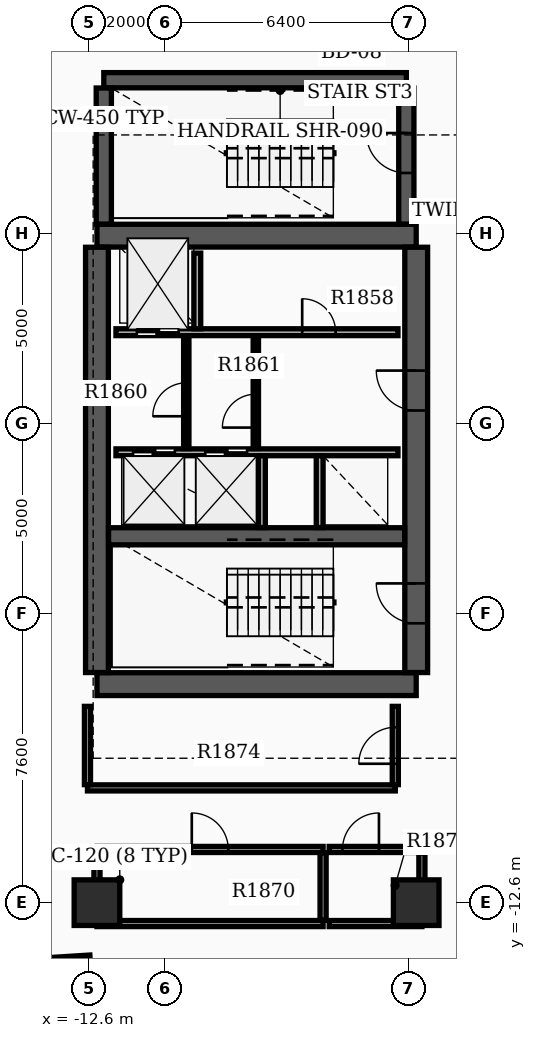
"""IFC4 building model, lengths in metres.
Left out: names, types, materials, properties, quantities, classifications, styles, units other than length and angle.
Written with IfcOpenShell. Run it as: python <this file> out.ifc"""

import sys

from ifc_helpers import new_model, si_unit, direction, frame, frame_2d, origin, origin_2d, place, context, subcontext, project, spatial, rectangle, extrude, element, fill, save


model = new_model("IFC4")
c1 = context("Model", 3, precision=1e-05, world=origin(), true_north=direction((0.0, 1.0)))
c2 = subcontext(c1, "Body", "Model", "MODEL_VIEW")
j1 = project(units=[si_unit("LENGTHUNIT", "METRE"), si_unit("PLANEANGLEUNIT", "RADIAN")], contexts=[c1])
p1 = place(None, origin())
s1 = spatial("IfcSite", under=j1, at=p1, CompositionType="ELEMENT")
p2 = place(p1, origin())
s2 = spatial("IfcBuilding", under=s1, at=p2, CompositionType="ELEMENT")
p3 = place(p2, frame((0.0, 0.0, 120.3)))
s3 = spatial("IfcBuildingStorey", under=s2, at=p3, CompositionType="ELEMENT", Elevation=120.3)
for number, where, z_axis, x_axis in (
    (1, (-12.4, -6.85, 0.0), (0.0, 0.0, 1.0), (1.0, 0.0, 0.0)),
    (2, (-12.4, 4.95, 0.0), (0.0, 0.0, 1.0), (1.0, 0.0, 0.0)),
):
    element("IfcWall", number, at=place(p3, frame(where, z_axis=z_axis, x_axis=x_axis)), inside=s3, PredefinedType="SHEAR", context=c2, shape_type="SweptSolid", body=[
        extrude(rectangle(XDim=8.4, YDim=0.6, at=frame_2d((4.2, 0.0))), origin(), (0.0, 0.0, 1.0), 3.7),
    ])
p4 = place(p3, frame((-12.4, -6.545, 0.0), z_axis=(0.0, 0.0, 1.0), x_axis=(0.0, 1.0, 0.0)))
e3 = element("IfcWall", 3, at=p4, inside=s3, PredefinedType="SHEAR", context=c2, shape_type="SweptSolid", body=[
    extrude(rectangle(XDim=11.19, YDim=0.6, at=frame_2d((5.595, 0.0))), origin(), (0.0, 0.0, 1.0), 3.7),
])
p5 = place(p3, frame((-4.0, -6.545, 0.0), z_axis=(0.0, 0.0, 1.0), x_axis=(0.0, 1.0, 0.0)))
e4 = element("IfcWall", 4, at=p5, inside=s3, PredefinedType="SHEAR", context=c2, shape_type="SweptSolid", body=[
    extrude(rectangle(XDim=11.19, YDim=0.6, at=frame_2d((5.595, 0.0))), origin(), (0.0, 0.0, 1.0), 3.7),
])
p6 = place(p5, frame((1.295, 0.0, 0.0)))
e5 = element("IfcOpeningElement", 5, at=p6, cuts=e4, PredefinedType="OPENING", context=c2, shape_type="SweptSolid", body=[
    extrude(rectangle(XDim=1.05, YDim=2.15, at=frame_2d((0.525, 1.075))), frame((0.0, 0.31, 0.0), z_axis=(0.0, -1.0, 0.0), x_axis=(1.0, 0.0, 0.0)), (0.0, 0.0, 1.0), 0.62),
])
p7 = place(p5, frame((6.895, 0.0, 0.0)))
e6 = element("IfcOpeningElement", 6, at=p7, cuts=e4, PredefinedType="OPENING", context=c2, shape_type="SweptSolid", body=[
    extrude(rectangle(XDim=1.05, YDim=2.15, at=frame_2d((0.525, 1.075))), frame((0.0, 0.31, 0.0), z_axis=(0.0, -1.0, 0.0), x_axis=(1.0, 0.0, 0.0)), (0.0, 0.0, 1.0), 0.62),
])
p8 = place(p3, frame((-12.095, -2.96, 0.0), z_axis=(0.0, 0.0, 1.0), x_axis=(1.0, 0.0, 0.0)))
e7 = element("IfcWall", 7, at=p8, inside=s3, PredefinedType="SHEAR", context=c2, shape_type="SweptSolid", body=[
    extrude(rectangle(XDim=7.79, YDim=0.45, at=frame_2d((3.895, 0.0))), origin(), (0.0, 0.0, 1.0), 3.7),
])
p9 = place(p3, frame((-12.22, 9.04, 0.0), z_axis=(0.0, 0.0, 1.0), x_axis=(1.0, 0.0, 0.0)))
e8 = element("IfcWall", 8, at=p9, inside=s3, PredefinedType="SHEAR", context=c2, shape_type="SweptSolid", body=[
    extrude(rectangle(XDim=7.96, YDim=0.4, at=frame_2d((3.98, 0.0))), origin(), (0.0, 0.0, 1.0), 3.7),
])
p10 = place(p3, frame((-12.22, 5.255, 0.0), z_axis=(0.0, 0.0, 1.0), x_axis=(0.0, 1.0, 0.0)))
e9 = element("IfcWall", 9, at=p10, inside=s3, PredefinedType="SHEAR", context=c2, shape_type="SweptSolid", body=[
    extrude(rectangle(XDim=3.58, YDim=0.4, at=frame_2d((1.79, 0.0))), origin(), (0.0, 0.0, 1.0), 3.7),
])
p11 = place(p3, frame((-4.26, 5.255, 0.0), z_axis=(0.0, 0.0, 1.0), x_axis=(0.0, 1.0, 0.0)))
e10 = element("IfcWall", 10, at=p11, inside=s3, PredefinedType="SHEAR", context=c2, shape_type="SweptSolid", body=[
    extrude(rectangle(XDim=3.58, YDim=0.4, at=frame_2d((1.79, 0.0))), origin(), (0.0, 0.0, 1.0), 3.7),
])
p12 = place(p11, frame((1.345, 0.0, 0.0)))
e11 = element("IfcOpeningElement", 11, at=p12, cuts=e10, PredefinedType="OPENING", context=c2, shape_type="SweptSolid", body=[
    extrude(rectangle(XDim=1.05, YDim=2.15, at=frame_2d((0.525, 1.075))), frame((0.0, 0.21, 0.0), z_axis=(0.0, -1.0, 0.0), x_axis=(1.0, 0.0, 0.0)), (0.0, 0.0, 1.0), 0.42),
])
for number, where, z_axis, x_axis in (
    (12, (-12.4, -12.6, 0.0), (0.0, 0.0, 1.0), (1.0, 0.0, 0.0)),
    (13, (-4.0, -12.6, 0.0), (0.0, 0.0, 1.0), (1.0, 0.0, 0.0)),
):
    element("IfcColumn", number, at=place(p3, frame(where, z_axis=z_axis, x_axis=x_axis)), inside=s3, PredefinedType="COLUMN", context=c2, shape_type="SweptSolid", body=[
        extrude(rectangle(XDim=1.2, YDim=1.2, at=origin_2d()), origin(), (0.0, 0.0, 1.0), 3.9),
    ])
p13 = place(p3, frame((-13.796, -14.194, 0.0), z_axis=(0.0, 0.0, 1.0), x_axis=(0.998023660242, 0.06283926796, 0.0)))
e14 = element("IfcWall", 14, at=p13, inside=s3, PredefinedType="STANDARD", context=c2, shape_type="SweptSolid", body=[
    extrude(rectangle(XDim=1.22, YDim=0.28, at=frame_2d((0.61, 0.0))), origin(), (0.0, 0.0, 1.0), 2.97),
])
p14 = place(p3, frame((-11.9, 2.41, 0.0), z_axis=(0.0, 0.0, 1.0), x_axis=(1.0, 0.0, 0.0)))
e15 = element("IfcWall", 15, at=p14, inside=s3, PredefinedType="SOLIDWALL", context=c2, shape_type="SweptSolid", body=[
    extrude(rectangle(XDim=7.42, YDim=0.18, at=frame_2d((3.71, 0.0))), origin(), (0.0, 0.0, 1.0), 2.96),
])
p15 = place(p14, frame((0.55, 0.0, 0.0)))
e16 = element("IfcOpeningElement", 16, at=p15, cuts=e15, PredefinedType="OPENING", context=c2, shape_type="SweptSolid", body=[
    extrude(rectangle(XDim=1.1, YDim=2.15, at=frame_2d((0.55, 1.075))), frame((0.0, 0.1, 0.0), z_axis=(0.0, -1.0, 0.0), x_axis=(1.0, 0.0, 0.0)), (0.0, 0.0, 1.0), 0.2),
])
p16 = place(p14, frame((4.9, 0.0, 0.0)))
e17 = element("IfcOpeningElement", 17, at=p16, cuts=e15, PredefinedType="OPENING", context=c2, shape_type="SweptSolid", body=[
    extrude(rectangle(XDim=0.88, YDim=2.1, at=frame_2d((0.44, 1.05))), frame((0.0, 0.1, 0.0), z_axis=(0.0, -1.0, 0.0), x_axis=(1.0, 0.0, 0.0)), (0.0, 0.0, 1.0), 0.2),
])
p17 = place(p3, frame((-11.9, -0.75, 0.0), z_axis=(0.0, 0.0, 1.0), x_axis=(1.0, 0.0, 0.0)))
e18 = element("IfcWall", 18, at=p17, inside=s3, PredefinedType="SOLIDWALL", context=c2, shape_type="SweptSolid", body=[
    extrude(rectangle(XDim=7.42, YDim=0.18, at=frame_2d((3.71, 0.0))), origin(), (0.0, 0.0, 1.0), 2.96),
])
p18 = place(p17, frame((0.45, 0.0, 0.0)))
e19 = element("IfcOpeningElement", 19, at=p18, cuts=e18, PredefinedType="OPENING", context=c2, shape_type="SweptSolid", body=[
    extrude(rectangle(XDim=1.1, YDim=2.15, at=frame_2d((0.55, 1.075))), frame((0.0, 0.1, 0.0), z_axis=(0.0, -1.0, 0.0), x_axis=(1.0, 0.0, 0.0)), (0.0, 0.0, 1.0), 0.2),
])
p19 = place(p17, frame((2.35, 0.0, 0.0)))
e20 = element("IfcOpeningElement", 20, at=p19, cuts=e18, PredefinedType="OPENING", context=c2, shape_type="SweptSolid", body=[
    extrude(rectangle(XDim=1.1, YDim=2.15, at=frame_2d((0.55, 1.075))), frame((0.0, 0.1, 0.0), z_axis=(0.0, -1.0, 0.0), x_axis=(1.0, 0.0, 0.0)), (0.0, 0.0, 1.0), 0.2),
])
p20 = place(p3, frame((-9.76, 2.5, 0.0), z_axis=(0.0, 0.0, 1.0), x_axis=(0.0, 1.0, 0.0)))
e21 = element("IfcWall", 21, at=p20, inside=s3, PredefinedType="SOLIDWALL", context=c2, shape_type="SweptSolid", body=[
    extrude(rectangle(XDim=1.99, YDim=0.18, at=frame_2d((0.995, 0.0))), origin(), (0.0, 0.0, 1.0), 2.96),
])
for number, where, z_axis, x_axis in (
    (22, (-8.06, -2.73, 0.0), (0.0, 0.0, 1.0), (0.0, 1.0, 0.0)),
    (23, (-6.54, -2.73, 0.0), (0.0, 0.0, 1.0), (0.0, 1.0, 0.0)),
):
    element("IfcWall", number, at=place(p3, frame(where, z_axis=z_axis, x_axis=x_axis)), inside=s3, PredefinedType="SOLIDWALL", context=c2, shape_type="SweptSolid", body=[
        extrude(rectangle(XDim=1.89, YDim=0.18, at=frame_2d((0.945, 0.0))), origin(), (0.0, 0.0, 1.0), 2.96),
    ])
p21 = place(p3, frame((-8.22, -0.65, 0.0), z_axis=(0.0, 0.0, 1.0), x_axis=(0.0, 1.0, 0.0)))
e24 = element("IfcWall", 24, at=p21, inside=s3, PredefinedType="SOLIDWALL", context=c2, shape_type="SweptSolid", body=[
    extrude(rectangle(XDim=2.96, YDim=0.14, at=frame_2d((1.48, 0.0))), origin(), (0.0, 0.0, 1.0), 2.96),
])
p22 = place(p21, frame((0.55, 0.0, 0.0)))
e25 = element("IfcOpeningElement", 25, at=p22, cuts=e24, PredefinedType="OPENING", context=c2, shape_type="SweptSolid", body=[
    extrude(rectangle(XDim=0.88, YDim=2.1, at=frame_2d((0.44, 1.05))), frame((0.0, 0.08, 0.0), z_axis=(0.0, -1.0, 0.0), x_axis=(1.0, 0.0, 0.0)), (0.0, 0.0, 1.0), 0.16),
])
p23 = place(p3, frame((-10.05, -0.652, 0.0), z_axis=(0.0, 0.0, 1.0), x_axis=(0.0, 1.0, 0.0)))
e26 = element("IfcWall", 26, at=p23, inside=s3, PredefinedType="PARTITIONING", context=c2, shape_type="SweptSolid", body=[
    extrude(rectangle(XDim=2.962, YDim=0.14, at=frame_2d((1.481, 0.0))), origin(), (0.0, 0.0, 1.0), 2.96),
])
p24 = place(p23, frame((0.85, 0.0, 0.0)))
e27 = element("IfcOpeningElement", 27, at=p24, cuts=e26, PredefinedType="OPENING", context=c2, shape_type="SweptSolid", body=[
    extrude(rectangle(XDim=0.88, YDim=2.1, at=frame_2d((0.44, 1.05))), frame((0.0, 0.08, 0.0), z_axis=(0.0, -1.0, 0.0), x_axis=(1.0, 0.0, 0.0)), (0.0, 0.0, 1.0), 0.16),
])
p25 = place(p3, frame((-12.4, -13.15, 0.0), z_axis=(0.0, 0.0, 1.0), x_axis=(1.0, 0.0, 0.0)))
e28 = element("IfcWall", 28, at=p25, inside=s3, PredefinedType="PARTITIONING", context=c2, shape_type="SweptSolid", body=[
    extrude(rectangle(XDim=5.95, YDim=0.16, at=frame_2d((2.975, 0.0))), origin(), (0.0, 0.0, 1.0), 2.96),
])
p26 = place(p3, frame((-12.4, -11.2, 0.0), z_axis=(0.0, 0.0, 1.0), x_axis=(1.0, 0.0, 0.0)))
e29 = element("IfcWall", 29, at=p26, inside=s3, PredefinedType="PARTITIONING", context=c2, shape_type="SweptSolid", body=[
    extrude(rectangle(XDim=5.95, YDim=0.16, at=frame_2d((2.975, 0.0))), origin(), (0.0, 0.0, 1.0), 2.96),
])
p27 = place(p26, frame((2.495, 0.0, 0.0)))
e30 = element("IfcOpeningElement", 30, at=p27, cuts=e29, PredefinedType="OPENING", context=c2, shape_type="SweptSolid", body=[
    extrude(rectangle(XDim=0.96, YDim=2.15, at=frame_2d((0.48, 1.075))), frame((0.0, 0.09, 0.0), z_axis=(0.0, -1.0, 0.0), x_axis=(1.0, 0.0, 0.0)), (0.0, 0.0, 1.0), 0.18),
])
for number, where, z_axis, x_axis in (
    (31, (-12.4, -13.065, 0.0), (0.0, 0.0, 1.0), (0.0, 1.0, 0.0)),
    (32, (-6.45, -13.065, 0.0), (0.0, 0.0, 1.0), (0.0, 1.0, 0.0)),
):
    element("IfcWall", number, at=place(p3, frame(where, z_axis=z_axis, x_axis=x_axis)), inside=s3, PredefinedType="PARTITIONING", context=c2, shape_type="SweptSolid", body=[
        extrude(rectangle(XDim=1.78, YDim=0.16, at=frame_2d((0.89, 0.0))), origin(), (0.0, 0.0, 1.0), 2.96),
    ])
p28 = place(p3, frame((-6.29, -13.15, 0.0), z_axis=(0.0, 0.0, 1.0), x_axis=(1.0, 0.0, 0.0)))
e33 = element("IfcWall", 33, at=p28, inside=s3, PredefinedType="PARTITIONING", context=c2, shape_type="SweptSolid", body=[
    extrude(rectangle(XDim=2.44, YDim=0.16, at=frame_2d((1.22, 0.0))), origin(), (0.0, 0.0, 1.0), 2.96),
])
p29 = place(p3, frame((-6.29, -11.2, 0.0), z_axis=(0.0, 0.0, 1.0), x_axis=(1.0, 0.0, 0.0)))
e34 = element("IfcWall", 34, at=p29, inside=s3, PredefinedType="PARTITIONING", context=c2, shape_type="SweptSolid", body=[
    extrude(rectangle(XDim=2.44, YDim=0.16, at=frame_2d((1.22, 0.0))), origin(), (0.0, 0.0, 1.0), 2.96),
])
p30 = place(p29, frame((0.35, 0.0, 0.0)))
e35 = element("IfcOpeningElement", 35, at=p30, cuts=e34, PredefinedType="OPENING", context=c2, shape_type="SweptSolid", body=[
    extrude(rectangle(XDim=0.96, YDim=2.15, at=frame_2d((0.48, 1.075))), frame((0.0, 0.09, 0.0), z_axis=(0.0, -1.0, 0.0), x_axis=(1.0, 0.0, 0.0)), (0.0, 0.0, 1.0), 0.18),
])
p31 = place(p3, frame((-3.85, -13.065, 0.0), z_axis=(0.0, 0.0, 1.0), x_axis=(0.0, 1.0, 0.0)))
e36 = element("IfcWall", 36, at=p31, inside=s3, PredefinedType="PARTITIONING", context=c2, shape_type="SweptSolid", body=[
    extrude(rectangle(XDim=1.78, YDim=0.16, at=frame_2d((0.89, 0.0))), origin(), (0.0, 0.0, 1.0), 2.96),
])
p32 = place(p3, frame((-12.65, -9.58, 0.0), z_axis=(0.0, 0.0, 1.0), x_axis=(1.0, 0.0, 0.0)))
e37 = element("IfcWall", 37, at=p32, inside=s3, PredefinedType="PARTITIONING", context=c2, shape_type="SweptSolid", body=[
    extrude(rectangle(XDim=8.1, YDim=0.16, at=frame_2d((4.05, 0.0))), origin(), (0.0, 0.0, 1.0), 2.96),
])
p33 = place(p3, frame((-12.65, -9.495, 0.0), z_axis=(0.0, 0.0, 1.0), x_axis=(0.0, 1.0, 0.0)))
e38 = element("IfcWall", 38, at=p33, inside=s3, PredefinedType="PARTITIONING", context=c2, shape_type="SweptSolid", body=[
    extrude(rectangle(XDim=2.06, YDim=0.16, at=frame_2d((1.03, 0.0))), origin(), (0.0, 0.0, 1.0), 2.96),
])
p34 = place(p3, frame((-4.55, -9.495, 0.0), z_axis=(0.0, 0.0, 1.0), x_axis=(0.0, 1.0, 0.0)))
e39 = element("IfcWall", 39, at=p34, inside=s3, PredefinedType="PARTITIONING", context=c2, shape_type="SweptSolid", body=[
    extrude(rectangle(XDim=2.06, YDim=0.16, at=frame_2d((1.03, 0.0))), origin(), (0.0, 0.0, 1.0), 2.96),
])
p35 = place(p34, frame((0.55, 0.0, 0.0)))
e40 = element("IfcOpeningElement", 40, at=p35, cuts=e39, PredefinedType="OPENING", context=c2, shape_type="SweptSolid", body=[
    extrude(rectangle(XDim=0.96, YDim=2.15, at=frame_2d((0.48, 1.075))), frame((0.0, 0.09, 0.0), z_axis=(0.0, -1.0, 0.0), x_axis=(1.0, 0.0, 0.0)), (0.0, 0.0, 1.0), 0.18),
])
p36 = place(p6, origin())
e41 = element("IfcDoor", 41, at=p36, inside=s3, OperationType="SINGLE_SWING_RIGHT", PredefinedType="DOOR", context=c2, shape_type="SweptSolid", body=[
    extrude(rectangle(XDim=1.05, YDim=2.15, at=frame_2d((0.525, 1.075))), frame((0.0, 0.025, 0.0), z_axis=(0.0, -1.0, 0.0), x_axis=(1.0, 0.0, 0.0)), (0.0, 0.0, 1.0), 0.05),
])
fill(e5, e41)
p37 = place(p7, origin())
e42 = element("IfcDoor", 42, at=p37, inside=s3, OperationType="SINGLE_SWING_RIGHT", PredefinedType="DOOR", context=c2, shape_type="SweptSolid", body=[
    extrude(rectangle(XDim=1.05, YDim=2.15, at=frame_2d((0.525, 1.075))), frame((0.0, 0.025, 0.0), z_axis=(0.0, -1.0, 0.0), x_axis=(1.0, 0.0, 0.0)), (0.0, 0.0, 1.0), 0.05),
])
fill(e6, e42)
p38 = place(p12, origin())
e43 = element("IfcDoor", 43, at=p38, inside=s3, OperationType="SINGLE_SWING_RIGHT", PredefinedType="DOOR", context=c2, shape_type="SweptSolid", body=[
    extrude(rectangle(XDim=1.05, YDim=2.15, at=frame_2d((0.525, 1.075))), frame((0.0, 0.025, 0.0), z_axis=(0.0, -1.0, 0.0), x_axis=(1.0, 0.0, 0.0)), (0.0, 0.0, 1.0), 0.05),
])
fill(e11, e43)
p39 = place(p15, origin())
e44 = element("IfcDoor", 44, at=p39, inside=s3, OperationType="DOUBLE_DOOR_SLIDING", PredefinedType="DOOR", context=c2, shape_type="SweptSolid", body=[
    extrude(rectangle(XDim=1.1, YDim=2.15, at=frame_2d((0.55, 1.075))), frame((0.0, 0.025, 0.0), z_axis=(0.0, -1.0, 0.0), x_axis=(1.0, 0.0, 0.0)), (0.0, 0.0, 1.0), 0.05),
])
fill(e16, e44)
p40 = place(p18, origin())
e45 = element("IfcDoor", 45, at=p40, inside=s3, OperationType="DOUBLE_DOOR_SLIDING", PredefinedType="DOOR", context=c2, shape_type="SweptSolid", body=[
    extrude(rectangle(XDim=1.1, YDim=2.15, at=frame_2d((0.55, 1.075))), frame((0.0, 0.025, 0.0), z_axis=(0.0, -1.0, 0.0), x_axis=(1.0, 0.0, 0.0)), (0.0, 0.0, 1.0), 0.05),
])
fill(e19, e45)
p41 = place(p19, origin())
e46 = element("IfcDoor", 46, at=p41, inside=s3, OperationType="DOUBLE_DOOR_SLIDING", PredefinedType="DOOR", context=c2, shape_type="SweptSolid", body=[
    extrude(rectangle(XDim=1.1, YDim=2.15, at=frame_2d((0.55, 1.075))), frame((0.0, 0.025, 0.0), z_axis=(0.0, -1.0, 0.0), x_axis=(1.0, 0.0, 0.0)), (0.0, 0.0, 1.0), 0.05),
])
fill(e20, e46)
p42 = place(p16, origin())
e47 = element("IfcDoor", 47, at=p42, inside=s3, OperationType="SINGLE_SWING_LEFT", PredefinedType="DOOR", context=c2, shape_type="SweptSolid", body=[
    extrude(rectangle(XDim=0.88, YDim=2.1, at=frame_2d((0.44, 1.05))), frame((0.0, 0.025, 0.0), z_axis=(0.0, -1.0, 0.0), x_axis=(1.0, 0.0, 0.0)), (0.0, 0.0, 1.0), 0.05),
])
fill(e17, e47)
p43 = place(p22, origin())
e48 = element("IfcDoor", 48, at=p43, inside=s3, OperationType="SINGLE_SWING_LEFT", PredefinedType="DOOR", context=c2, shape_type="SweptSolid", body=[
    extrude(rectangle(XDim=0.88, YDim=2.1, at=frame_2d((0.44, 1.05))), frame((0.0, 0.025, 0.0), z_axis=(0.0, -1.0, 0.0), x_axis=(1.0, 0.0, 0.0)), (0.0, 0.0, 1.0), 0.05),
])
fill(e25, e48)
p44 = place(p24, origin())
e49 = element("IfcDoor", 49, at=p44, inside=s3, OperationType="SINGLE_SWING_LEFT", PredefinedType="DOOR", context=c2, shape_type="SweptSolid", body=[
    extrude(rectangle(XDim=0.88, YDim=2.1, at=frame_2d((0.44, 1.05))), frame((0.0, 0.025, 0.0), z_axis=(0.0, -1.0, 0.0), x_axis=(1.0, 0.0, 0.0)), (0.0, 0.0, 1.0), 0.05),
])
fill(e27, e49)
p45 = place(p27, origin())
e50 = element("IfcDoor", 50, at=p45, inside=s3, OperationType="SINGLE_SWING_LEFT", PredefinedType="DOOR", context=c2, shape_type="SweptSolid", body=[
    extrude(rectangle(XDim=0.96, YDim=2.15, at=frame_2d((0.48, 1.075))), frame((0.0, 0.025, 0.0), z_axis=(0.0, -1.0, 0.0), x_axis=(1.0, 0.0, 0.0)), (0.0, 0.0, 1.0), 0.05),
])
fill(e30, e50)
p46 = place(p30, origin())
e51 = element("IfcDoor", 51, at=p46, inside=s3, OperationType="SINGLE_SWING_RIGHT", PredefinedType="DOOR", context=c2, shape_type="SweptSolid", body=[
    extrude(rectangle(XDim=0.96, YDim=2.15, at=frame_2d((0.48, 1.075))), frame((0.0, 0.025, 0.0), z_axis=(0.0, -1.0, 0.0), x_axis=(1.0, 0.0, 0.0)), (0.0, 0.0, 1.0), 0.05),
])
fill(e35, e51)
p47 = place(p35, origin())
e52 = element("IfcDoor", 52, at=p47, inside=s3, OperationType="SINGLE_SWING_LEFT", PredefinedType="DOOR", context=c2, shape_type="SweptSolid", body=[
    extrude(rectangle(XDim=0.96, YDim=2.15, at=frame_2d((0.48, 1.075))), frame((0.0, 0.025, 0.0), z_axis=(0.0, -1.0, 0.0), x_axis=(1.0, 0.0, 0.0)), (0.0, 0.0, 1.0), 0.05),
])
fill(e40, e52)
save(model, sys.argv[1])
